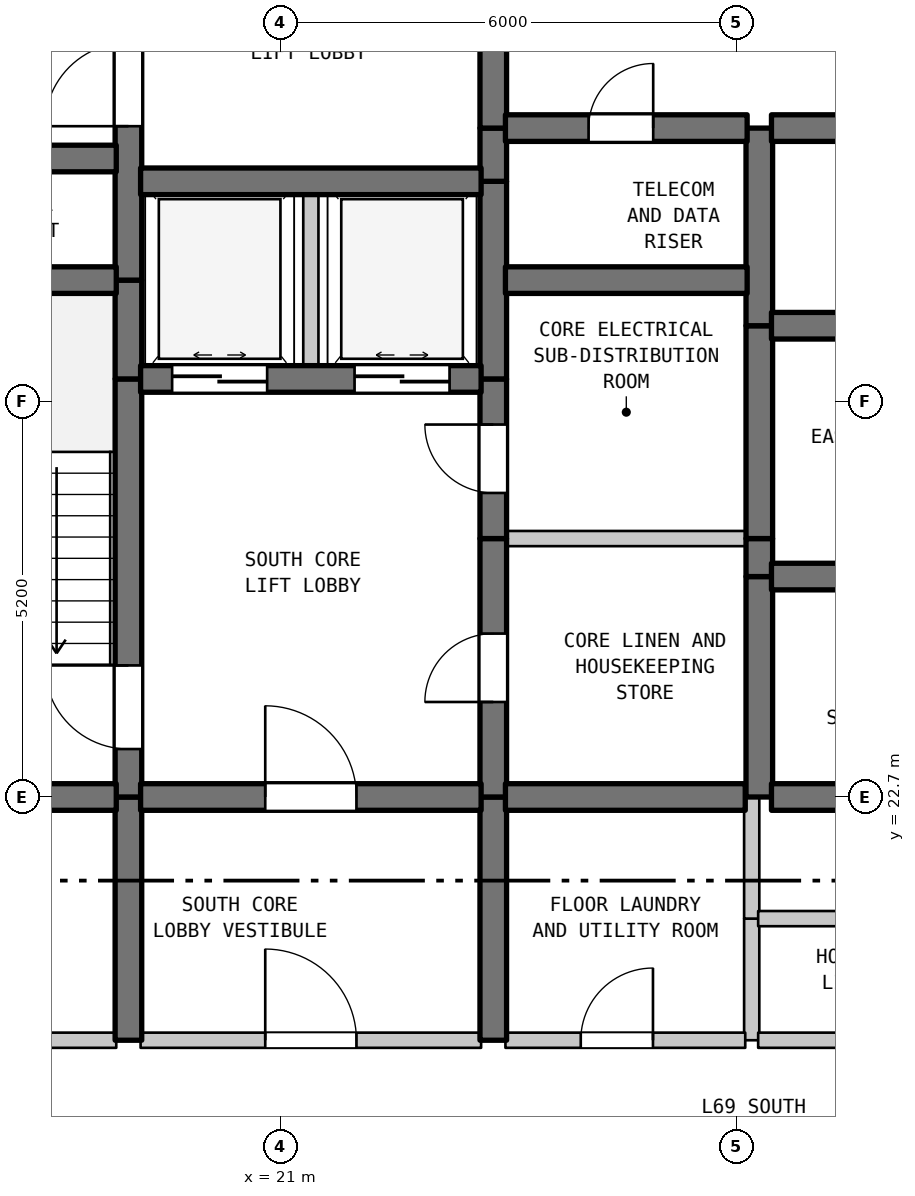
"""IFC4 building model, lengths in metres.
Left out: names, types, materials, properties, quantities, classifications, styles, units other than length and angle.
Written with IfcOpenShell. Run it as: python <this file> out.ifc"""

import sys

from ifc_helpers import new_model, si_unit, direction, frame, frame_2d, origin, place, context, subcontext, project, spatial, rectangle, extrude, element, fill, save


model = new_model("IFC4")
c1 = context("Model", 3, precision=1e-05, world=origin(), true_north=direction((0.0, 1.0)))
c2 = subcontext(c1, "Body", "Model", "MODEL_VIEW")
j1 = project(units=[si_unit("LENGTHUNIT", "METRE"), si_unit("PLANEANGLEUNIT", "RADIAN")], contexts=[c1])
p1 = place(None, origin())
s1 = spatial("IfcSite", under=j1, at=p1, CompositionType="ELEMENT")
p2 = place(p1, origin())
s2 = spatial("IfcBuilding", under=s1, at=p2, CompositionType="ELEMENT")
p3 = place(p2, frame((0.0, 0.0, 276.9)))
s3 = spatial("IfcBuildingStorey", under=s2, at=p3, CompositionType="ELEMENT", Elevation=276.9)
p4 = place(p3, frame((19.0, 19.5, 0.0), z_axis=(0.0, 0.0, 1.0), x_axis=(0.0, 1.0, 0.0)))
e1 = element("IfcWall", 1, at=p4, inside=s3, PredefinedType="SHEAR", context=c2, shape_type="SweptSolid", body=[
    extrude(rectangle(XDim=3.2, YDim=0.35, at=frame_2d((1.6, 0.0))), origin(), (0.0, 0.0, 1.0), 3.39),
])
p5 = place(p3, frame((19.0, 22.7, 0.0), z_axis=(0.0, 0.0, 1.0), x_axis=(0.0, 1.0, 0.0)))
e2 = element("IfcWall", 2, at=p5, inside=s3, PredefinedType="SHEAR", context=c2, shape_type="SweptSolid", body=[
    extrude(rectangle(XDim=5.5, YDim=0.35, at=frame_2d((2.75, 0.0))), origin(), (0.0, 0.0, 1.0), 3.39),
])
p6 = place(p5, frame((0.631, 0.0, 0.0)))
e3 = element("IfcOpeningElement", 3, at=p6, cuts=e2, PredefinedType="OPENING", context=c2, shape_type="SweptSolid", body=[
    extrude(rectangle(XDim=1.1, YDim=2.15, at=frame_2d((0.55, 1.075))), frame((0.0, 0.185, 0.0), z_axis=(0.0, -1.0, 0.0), x_axis=(1.0, 0.0, 0.0)), (0.0, 0.0, 1.0), 0.37),
])
p7 = place(p3, frame((19.0, 28.2, 0.0), z_axis=(0.0, 0.0, 1.0), x_axis=(0.0, 1.0, 0.0)))
e4 = element("IfcWall", 4, at=p7, inside=s3, PredefinedType="SHEAR", context=c2, shape_type="SweptSolid", body=[
    extrude(rectangle(XDim=1.3, YDim=0.35, at=frame_2d((0.65, 0.0))), origin(), (0.0, 0.0, 1.0), 3.39),
])
p8 = place(p3, frame((19.0, 29.5, 0.0), z_axis=(0.0, 0.0, 1.0), x_axis=(0.0, 1.0, 0.0)))
e5 = element("IfcWall", 5, at=p8, inside=s3, PredefinedType="SHEAR", context=c2, shape_type="SweptSolid", body=[
    extrude(rectangle(XDim=5.5, YDim=0.35, at=frame_2d((2.75, 0.0))), origin(), (0.0, 0.0, 1.0), 3.39),
])
p9 = place(p8, frame((2.025, 0.0, 0.0)))
e6 = element("IfcOpeningElement", 6, at=p9, cuts=e5, PredefinedType="OPENING", context=c2, shape_type="SweptSolid", body=[
    extrude(rectangle(XDim=1.1, YDim=2.15, at=frame_2d((0.55, 1.075))), frame((0.0, 0.185, 0.0), z_axis=(0.0, -1.0, 0.0), x_axis=(1.0, 0.0, 0.0)), (0.0, 0.0, 1.0), 0.37),
])
p10 = place(p3, frame((21.4, 28.2, 0.0), z_axis=(0.0, 0.0, 1.0), x_axis=(0.0, 1.0, 0.0)))
e7 = element("IfcWall", 7, at=p10, inside=s3, PredefinedType="STANDARD", context=c2, shape_type="SweptSolid", body=[
    extrude(rectangle(XDim=2.6, YDim=0.2, at=frame_2d((1.3, 0.0))), origin(), (0.0, 0.0, 1.0), 3.39),
])
p11 = place(p3, frame((23.8, 19.5, 0.0), z_axis=(0.0, 0.0, 1.0), x_axis=(0.0, 1.0, 0.0)))
e8 = element("IfcWall", 8, at=p11, inside=s3, PredefinedType="SHEAR", context=c2, shape_type="SweptSolid", body=[
    extrude(rectangle(XDim=3.2, YDim=0.35, at=frame_2d((1.6, 0.0))), origin(), (0.0, 0.0, 1.0), 3.39),
])
p12 = place(p3, frame((23.8, 22.7, 0.0), z_axis=(0.0, 0.0, 1.0), x_axis=(0.0, 1.0, 0.0)))
e9 = element("IfcWall", 9, at=p12, inside=s3, PredefinedType="SHEAR", context=c2, shape_type="SweptSolid", body=[
    extrude(rectangle(XDim=3.4, YDim=0.35, at=frame_2d((1.7, 0.0))), origin(), (0.0, 0.0, 1.0), 3.39),
])
p13 = place(p12, frame((1.25, 0.0, 0.0)))
e10 = element("IfcOpeningElement", 10, at=p13, cuts=e9, PredefinedType="OPENING", context=c2, shape_type="SweptSolid", body=[
    extrude(rectangle(XDim=0.9, YDim=2.15, at=frame_2d((0.45, 1.075))), frame((0.0, 0.185, 0.0), z_axis=(0.0, -1.0, 0.0), x_axis=(1.0, 0.0, 0.0)), (0.0, 0.0, 1.0), 0.37),
])
p14 = place(p3, frame((23.8, 26.1, 0.0), z_axis=(0.0, 0.0, 1.0), x_axis=(0.0, 1.0, 0.0)))
e11 = element("IfcWall", 11, at=p14, inside=s3, PredefinedType="SHEAR", context=c2, shape_type="SweptSolid", body=[
    extrude(rectangle(XDim=2.1, YDim=0.35, at=frame_2d((1.05, 0.0))), origin(), (0.0, 0.0, 1.0), 3.39),
])
p15 = place(p14, frame((0.6, 0.0, 0.0)))
e12 = element("IfcOpeningElement", 12, at=p15, cuts=e11, PredefinedType="OPENING", context=c2, shape_type="SweptSolid", body=[
    extrude(rectangle(XDim=0.9, YDim=2.15, at=frame_2d((0.45, 1.075))), frame((0.0, 0.185, 0.0), z_axis=(0.0, -1.0, 0.0), x_axis=(1.0, 0.0, 0.0)), (0.0, 0.0, 1.0), 0.37),
])
p16 = place(p3, frame((23.8, 28.2, 0.0), z_axis=(0.0, 0.0, 1.0), x_axis=(0.0, 1.0, 0.0)))
e13 = element("IfcWall", 13, at=p16, inside=s3, PredefinedType="SHEAR", context=c2, shape_type="SweptSolid", body=[
    extrude(rectangle(XDim=2.6, YDim=0.35, at=frame_2d((1.3, 0.0))), origin(), (0.0, 0.0, 1.0), 3.39),
])
p17 = place(p3, frame((23.8, 30.8, 0.0), z_axis=(0.0, 0.0, 1.0), x_axis=(0.0, 1.0, 0.0)))
e14 = element("IfcWall", 14, at=p17, inside=s3, PredefinedType="SHEAR", context=c2, shape_type="SweptSolid", body=[
    extrude(rectangle(XDim=0.7, YDim=0.35, at=frame_2d((0.35, 0.0))), origin(), (0.0, 0.0, 1.0), 3.39),
])
p18 = place(p3, frame((23.8, 31.5, 0.0), z_axis=(0.0, 0.0, 1.0), x_axis=(0.0, 1.0, 0.0)))
e15 = element("IfcWall", 15, at=p18, inside=s3, PredefinedType="SHEAR", context=c2, shape_type="SweptSolid", body=[
    extrude(rectangle(XDim=3.5, YDim=0.35, at=frame_2d((1.75, 0.0))), origin(), (0.0, 0.0, 1.0), 3.39),
])
p19 = place(p18, frame((1.127, 0.0, 0.0)))
e16 = element("IfcOpeningElement", 16, at=p19, cuts=e15, PredefinedType="OPENING", context=c2, shape_type="SweptSolid", body=[
    extrude(rectangle(XDim=1.1, YDim=2.15, at=frame_2d((0.55, 1.075))), frame((0.0, 0.185, 0.0), z_axis=(0.0, -1.0, 0.0), x_axis=(1.0, 0.0, 0.0)), (0.0, 0.0, 1.0), 0.37),
])
p20 = place(p3, frame((27.2, 19.5, 0.0), z_axis=(0.0, 0.0, 1.0), x_axis=(0.0, 1.0, 0.0)))
e17 = element("IfcWall", 17, at=p20, inside=s3, PredefinedType="STANDARD", context=c2, shape_type="SweptSolid", body=[
    extrude(rectangle(XDim=1.6, YDim=0.2, at=frame_2d((0.8, 0.0))), origin(), (0.0, 0.0, 1.0), 3.39),
])
p21 = place(p3, frame((27.2, 21.1, 0.0), z_axis=(0.0, 0.0, 1.0), x_axis=(0.0, 1.0, 0.0)))
e18 = element("IfcWall", 18, at=p21, inside=s3, PredefinedType="STANDARD", context=c2, shape_type="SweptSolid", body=[
    extrude(rectangle(XDim=1.6, YDim=0.2, at=frame_2d((0.8, 0.0))), origin(), (0.0, 0.0, 1.0), 3.39),
])
p22 = place(p3, frame((27.3, 22.7, 0.0), z_axis=(0.0, 0.0, 1.0), x_axis=(0.0, 1.0, 0.0)))
e19 = element("IfcWall", 19, at=p22, inside=s3, PredefinedType="SHEAR", context=c2, shape_type="SweptSolid", body=[
    extrude(rectangle(XDim=2.9, YDim=0.35, at=frame_2d((1.45, 0.0))), origin(), (0.0, 0.0, 1.0), 3.39),
])
p23 = place(p3, frame((27.3, 25.6, 0.0), z_axis=(0.0, 0.0, 1.0), x_axis=(0.0, 1.0, 0.0)))
e20 = element("IfcWall", 20, at=p23, inside=s3, PredefinedType="SHEAR", context=c2, shape_type="SweptSolid", body=[
    extrude(rectangle(XDim=0.5, YDim=0.35, at=frame_2d((0.25, 0.0))), origin(), (0.0, 0.0, 1.0), 3.39),
])
p24 = place(p3, frame((27.3, 26.1, 0.0), z_axis=(0.0, 0.0, 1.0), x_axis=(0.0, 1.0, 0.0)))
e21 = element("IfcWall", 21, at=p24, inside=s3, PredefinedType="SHEAR", context=c2, shape_type="SweptSolid", body=[
    extrude(rectangle(XDim=2.8, YDim=0.35, at=frame_2d((1.4, 0.0))), origin(), (0.0, 0.0, 1.0), 3.39),
])
p25 = place(p3, frame((27.3, 28.9, 0.0), z_axis=(0.0, 0.0, 1.0), x_axis=(0.0, 1.0, 0.0)))
e22 = element("IfcWall", 22, at=p25, inside=s3, PredefinedType="SHEAR", context=c2, shape_type="SweptSolid", body=[
    extrude(rectangle(XDim=2.6, YDim=0.35, at=frame_2d((1.3, 0.0))), origin(), (0.0, 0.0, 1.0), 3.39),
])
p26 = place(p3, frame((15.16, 19.5, 0.0), z_axis=(0.0, 0.0, 1.0), x_axis=(1.0, 0.0, 0.0)))
e23 = element("IfcWall", 23, at=p26, inside=s3, PredefinedType="STANDARD", context=c2, shape_type="SweptSolid", body=[
    extrude(rectangle(XDim=3.68, YDim=0.2, at=frame_2d((1.84, 0.0))), origin(), (0.0, 0.0, 1.0), 3.39),
])
p27 = place(p26, frame((1.39, 0.0, 0.0)))
e24 = element("IfcOpeningElement", 24, at=p27, cuts=e23, PredefinedType="OPENING", context=c2, shape_type="SweptSolid", body=[
    extrude(rectangle(XDim=0.9, YDim=2.15, at=frame_2d((0.45, 1.075))), frame((0.0, 0.11, 0.0), z_axis=(0.0, -1.0, 0.0), x_axis=(1.0, 0.0, 0.0)), (0.0, 0.0, 1.0), 0.22),
])
p28 = place(p3, frame((19.16, 19.5, 0.0), z_axis=(0.0, 0.0, 1.0), x_axis=(1.0, 0.0, 0.0)))
e25 = element("IfcWall", 25, at=p28, inside=s3, PredefinedType="STANDARD", context=c2, shape_type="SweptSolid", body=[
    extrude(rectangle(XDim=4.48, YDim=0.2, at=frame_2d((2.24, 0.0))), origin(), (0.0, 0.0, 1.0), 3.39),
])
p29 = place(p28, frame((1.64, 0.0, 0.0)))
e26 = element("IfcOpeningElement", 26, at=p29, cuts=e25, PredefinedType="OPENING", context=c2, shape_type="SweptSolid", body=[
    extrude(rectangle(XDim=1.2, YDim=2.2, at=frame_2d((0.6, 1.1))), frame((0.0, 0.11, 0.0), z_axis=(0.0, -1.0, 0.0), x_axis=(1.0, 0.0, 0.0)), (0.0, 0.0, 1.0), 0.22),
])
p30 = place(p3, frame((23.96, 19.5, 0.0), z_axis=(0.0, 0.0, 1.0), x_axis=(1.0, 0.0, 0.0)))
e27 = element("IfcWall", 27, at=p30, inside=s3, PredefinedType="STANDARD", context=c2, shape_type="SweptSolid", body=[
    extrude(rectangle(XDim=3.155, YDim=0.2, at=frame_2d((1.578, 0.0))), origin(), (0.0, 0.0, 1.0), 3.39),
])
p31 = place(p30, frame((0.991, 0.0, 0.0)))
e28 = element("IfcOpeningElement", 28, at=p31, cuts=e27, PredefinedType="OPENING", context=c2, shape_type="SweptSolid", body=[
    extrude(rectangle(XDim=0.95, YDim=2.15, at=frame_2d((0.475, 1.075))), frame((0.0, 0.11, 0.0), z_axis=(0.0, -1.0, 0.0), x_axis=(1.0, 0.0, 0.0)), (0.0, 0.0, 1.0), 0.22),
])
p32 = place(p3, frame((27.285, 19.5, 0.0), z_axis=(0.0, 0.0, 1.0), x_axis=(1.0, 0.0, 0.0)))
e29 = element("IfcWall", 29, at=p32, inside=s3, PredefinedType="STANDARD", context=c2, shape_type="SweptSolid", body=[
    extrude(rectangle(XDim=3.43, YDim=0.2, at=frame_2d((1.715, 0.0))), origin(), (0.0, 0.0, 1.0), 3.39),
])
p33 = place(p32, frame((1.192, 0.0, 0.0)))
e30 = element("IfcOpeningElement", 30, at=p33, cuts=e29, PredefinedType="OPENING", context=c2, shape_type="SweptSolid", body=[
    extrude(rectangle(XDim=0.9, YDim=2.15, at=frame_2d((0.45, 1.075))), frame((0.0, 0.11, 0.0), z_axis=(0.0, -1.0, 0.0), x_axis=(1.0, 0.0, 0.0)), (0.0, 0.0, 1.0), 0.22),
])
p34 = place(p3, frame((27.285, 21.1, 0.0), z_axis=(0.0, 0.0, 1.0), x_axis=(1.0, 0.0, 0.0)))
e31 = element("IfcWall", 31, at=p34, inside=s3, PredefinedType="STANDARD", context=c2, shape_type="SweptSolid", body=[
    extrude(rectangle(XDim=3.355, YDim=0.2, at=frame_2d((1.677, 0.0))), origin(), (0.0, 0.0, 1.0), 3.39),
])
p35 = place(p3, frame((15.16, 22.7, 0.0), z_axis=(0.0, 0.0, 1.0), x_axis=(1.0, 0.0, 0.0)))
e32 = element("IfcWall", 32, at=p35, inside=s3, PredefinedType="SHEAR", context=c2, shape_type="SweptSolid", body=[
    extrude(rectangle(XDim=3.68, YDim=0.35, at=frame_2d((1.84, 0.0))), origin(), (0.0, 0.0, 1.0), 3.39),
])
p36 = place(p3, frame((19.16, 22.7, 0.0), z_axis=(0.0, 0.0, 1.0), x_axis=(1.0, 0.0, 0.0)))
e33 = element("IfcWall", 33, at=p36, inside=s3, PredefinedType="SHEAR", context=c2, shape_type="SweptSolid", body=[
    extrude(rectangle(XDim=4.48, YDim=0.35, at=frame_2d((2.24, 0.0))), origin(), (0.0, 0.0, 1.0), 3.39),
])
p37 = place(p36, frame((1.64, 0.0, 0.0)))
e34 = element("IfcOpeningElement", 34, at=p37, cuts=e33, PredefinedType="OPENING", context=c2, shape_type="SweptSolid", body=[
    extrude(rectangle(XDim=1.2, YDim=2.2, at=frame_2d((0.6, 1.1))), frame((0.0, 0.185, 0.0), z_axis=(0.0, -1.0, 0.0), x_axis=(1.0, 0.0, 0.0)), (0.0, 0.0, 1.0), 0.37),
])
p38 = place(p3, frame((23.96, 22.7, 0.0), z_axis=(0.0, 0.0, 1.0), x_axis=(1.0, 0.0, 0.0)))
e35 = element("IfcWall", 35, at=p38, inside=s3, PredefinedType="SHEAR", context=c2, shape_type="SweptSolid", body=[
    extrude(rectangle(XDim=3.155, YDim=0.35, at=frame_2d((1.578, 0.0))), origin(), (0.0, 0.0, 1.0), 3.39),
])
p39 = place(p3, frame((27.46, 22.7, 0.0), z_axis=(0.0, 0.0, 1.0), x_axis=(1.0, 0.0, 0.0)))
e36 = element("IfcWall", 36, at=p39, inside=s3, PredefinedType="SHEAR", context=c2, shape_type="SweptSolid", body=[
    extrude(rectangle(XDim=3.18, YDim=0.35, at=frame_2d((1.59, 0.0))), origin(), (0.0, 0.0, 1.0), 3.39),
])
p40 = place(p3, frame((27.46, 25.6, 0.0), z_axis=(0.0, 0.0, 1.0), x_axis=(1.0, 0.0, 0.0)))
e37 = element("IfcWall", 37, at=p40, inside=s3, PredefinedType="SHEAR", context=c2, shape_type="SweptSolid", body=[
    extrude(rectangle(XDim=3.18, YDim=0.35, at=frame_2d((1.59, 0.0))), origin(), (0.0, 0.0, 1.0), 3.39),
])
p41 = place(p40, frame((1.115, 0.0, 0.0)))
e38 = element("IfcOpeningElement", 38, at=p41, cuts=e37, PredefinedType="OPENING", context=c2, shape_type="SweptSolid", body=[
    extrude(rectangle(XDim=0.95, YDim=2.15, at=frame_2d((0.475, 1.075))), frame((0.0, 0.185, 0.0), z_axis=(0.0, -1.0, 0.0), x_axis=(1.0, 0.0, 0.0)), (0.0, 0.0, 1.0), 0.37),
])
p42 = place(p3, frame((23.96, 26.1, 0.0), z_axis=(0.0, 0.0, 1.0), x_axis=(1.0, 0.0, 0.0)))
e39 = element("IfcWall", 39, at=p42, inside=s3, PredefinedType="STANDARD", context=c2, shape_type="SweptSolid", body=[
    extrude(rectangle(XDim=3.18, YDim=0.2, at=frame_2d((1.59, 0.0))), origin(), (0.0, 0.0, 1.0), 3.39),
])
p43 = place(p3, frame((19.16, 28.2, 0.0), z_axis=(0.0, 0.0, 1.0), x_axis=(1.0, 0.0, 0.0)))
e40 = element("IfcWall", 40, at=p43, inside=s3, PredefinedType="SHEAR", context=c2, shape_type="SweptSolid", body=[
    extrude(rectangle(XDim=4.48, YDim=0.35, at=frame_2d((2.24, 0.0))), origin(), (0.0, 0.0, 1.0), 3.39),
])
p44 = place(p43, frame((0.415, 0.0, 0.0)))
e41 = element("IfcOpeningElement", 41, at=p44, cuts=e40, PredefinedType="OPENING", context=c2, shape_type="SweptSolid", body=[
    extrude(rectangle(XDim=1.25, YDim=2.2, at=frame_2d((0.625, 1.1))), frame((0.0, 0.185, 0.0), z_axis=(0.0, -1.0, 0.0), x_axis=(1.0, 0.0, 0.0)), (0.0, 0.0, 1.0), 0.37),
])
p45 = place(p43, frame((2.815, 0.0, 0.0)))
e42 = element("IfcOpeningElement", 42, at=p45, cuts=e40, PredefinedType="OPENING", context=c2, shape_type="SweptSolid", body=[
    extrude(rectangle(XDim=1.25, YDim=2.2, at=frame_2d((0.625, 1.1))), frame((0.0, 0.185, 0.0), z_axis=(0.0, -1.0, 0.0), x_axis=(1.0, 0.0, 0.0)), (0.0, 0.0, 1.0), 0.37),
])
p46 = place(p3, frame((27.46, 28.9, 0.0), z_axis=(0.0, 0.0, 1.0), x_axis=(1.0, 0.0, 0.0)))
e43 = element("IfcWall", 43, at=p46, inside=s3, PredefinedType="SHEAR", context=c2, shape_type="SweptSolid", body=[
    extrude(rectangle(XDim=3.18, YDim=0.35, at=frame_2d((1.59, 0.0))), origin(), (0.0, 0.0, 1.0), 3.39),
])
p47 = place(p46, frame((1.115, 0.0, 0.0)))
e44 = element("IfcOpeningElement", 44, at=p47, cuts=e43, PredefinedType="OPENING", context=c2, shape_type="SweptSolid", body=[
    extrude(rectangle(XDim=0.95, YDim=2.15, at=frame_2d((0.475, 1.075))), frame((0.0, 0.185, 0.0), z_axis=(0.0, -1.0, 0.0), x_axis=(1.0, 0.0, 0.0)), (0.0, 0.0, 1.0), 0.37),
])
p48 = place(p3, frame((15.16, 29.5, 0.0), z_axis=(0.0, 0.0, 1.0), x_axis=(1.0, 0.0, 0.0)))
e45 = element("IfcWall", 45, at=p48, inside=s3, PredefinedType="SHEAR", context=c2, shape_type="SweptSolid", body=[
    extrude(rectangle(XDim=3.68, YDim=0.35, at=frame_2d((1.84, 0.0))), origin(), (0.0, 0.0, 1.0), 3.39),
])
p49 = place(p3, frame((23.96, 29.5, 0.0), z_axis=(0.0, 0.0, 1.0), x_axis=(1.0, 0.0, 0.0)))
e46 = element("IfcWall", 46, at=p49, inside=s3, PredefinedType="SHEAR", context=c2, shape_type="SweptSolid", body=[
    extrude(rectangle(XDim=3.18, YDim=0.35, at=frame_2d((1.59, 0.0))), origin(), (0.0, 0.0, 1.0), 3.39),
])
p50 = place(p3, frame((19.16, 30.8, 0.0), z_axis=(0.0, 0.0, 1.0), x_axis=(1.0, 0.0, 0.0)))
e47 = element("IfcWall", 47, at=p50, inside=s3, PredefinedType="SHEAR", context=c2, shape_type="SweptSolid", body=[
    extrude(rectangle(XDim=4.48, YDim=0.35, at=frame_2d((2.24, 0.0))), origin(), (0.0, 0.0, 1.0), 3.39),
])
p51 = place(p3, frame((15.16, 31.1, 0.0), z_axis=(0.0, 0.0, 1.0), x_axis=(1.0, 0.0, 0.0)))
e48 = element("IfcWall", 48, at=p51, inside=s3, PredefinedType="SHEAR", context=c2, shape_type="SweptSolid", body=[
    extrude(rectangle(XDim=3.68, YDim=0.35, at=frame_2d((1.84, 0.0))), origin(), (0.0, 0.0, 1.0), 3.39),
])
p52 = place(p3, frame((23.96, 31.5, 0.0), z_axis=(0.0, 0.0, 1.0), x_axis=(1.0, 0.0, 0.0)))
e49 = element("IfcWall", 49, at=p52, inside=s3, PredefinedType="SHEAR", context=c2, shape_type="SweptSolid", body=[
    extrude(rectangle(XDim=3.18, YDim=0.35, at=frame_2d((1.59, 0.0))), origin(), (0.0, 0.0, 1.0), 3.39),
])
p53 = place(p52, frame((1.094, 0.0, 0.0)))
e50 = element("IfcOpeningElement", 50, at=p53, cuts=e49, PredefinedType="OPENING", context=c2, shape_type="SweptSolid", body=[
    extrude(rectangle(XDim=0.85, YDim=2.1, at=frame_2d((0.425, 1.05))), frame((0.0, 0.185, 0.0), z_axis=(0.0, -1.0, 0.0), x_axis=(1.0, 0.0, 0.0)), (0.0, 0.0, 1.0), 0.37),
])
p54 = place(p3, frame((27.46, 31.5, 0.0), z_axis=(0.0, 0.0, 1.0), x_axis=(1.0, 0.0, 0.0)))
e51 = element("IfcWall", 51, at=p54, inside=s3, PredefinedType="SHEAR", context=c2, shape_type="SweptSolid", body=[
    extrude(rectangle(XDim=3.18, YDim=0.35, at=frame_2d((1.59, 0.0))), origin(), (0.0, 0.0, 1.0), 3.39),
])
p55 = place(p6, origin())
e52 = element("IfcDoor", 52, at=p55, inside=s3, OperationType="SINGLE_SWING_RIGHT", PredefinedType="DOOR", context=c2, shape_type="SweptSolid", body=[
    extrude(rectangle(XDim=1.1, YDim=2.15, at=frame_2d((0.55, 1.075))), frame((0.0, 0.025, 0.0), z_axis=(0.0, -1.0, 0.0), x_axis=(1.0, 0.0, 0.0)), (0.0, 0.0, 1.0), 0.05),
])
fill(e3, e52)
p56 = place(p9, origin())
e53 = element("IfcDoor", 53, at=p56, inside=s3, OperationType="SINGLE_SWING_LEFT", PredefinedType="DOOR", context=c2, shape_type="SweptSolid", body=[
    extrude(rectangle(XDim=1.1, YDim=2.15, at=frame_2d((0.55, 1.075))), frame((0.0, 0.025, 0.0), z_axis=(0.0, -1.0, 0.0), x_axis=(1.0, 0.0, 0.0)), (0.0, 0.0, 1.0), 0.05),
])
fill(e6, e53)
p57 = place(p13, origin())
e54 = element("IfcDoor", 54, at=p57, inside=s3, OperationType="SINGLE_SWING_LEFT", PredefinedType="DOOR", context=c2, shape_type="SweptSolid", body=[
    extrude(rectangle(XDim=0.9, YDim=2.15, at=frame_2d((0.45, 1.075))), frame((0.0, 0.025, 0.0), z_axis=(0.0, -1.0, 0.0), x_axis=(1.0, 0.0, 0.0)), (0.0, 0.0, 1.0), 0.05),
])
fill(e10, e54)
p58 = place(p15, origin())
e55 = element("IfcDoor", 55, at=p58, inside=s3, OperationType="SINGLE_SWING_RIGHT", PredefinedType="DOOR", context=c2, shape_type="SweptSolid", body=[
    extrude(rectangle(XDim=0.9, YDim=2.15, at=frame_2d((0.45, 1.075))), frame((0.0, 0.025, 0.0), z_axis=(0.0, -1.0, 0.0), x_axis=(1.0, 0.0, 0.0)), (0.0, 0.0, 1.0), 0.05),
])
fill(e12, e55)
p59 = place(p29, origin())
e56 = element("IfcDoor", 56, at=p59, inside=s3, OperationType="SINGLE_SWING_LEFT", PredefinedType="DOOR", context=c2, shape_type="SweptSolid", body=[
    extrude(rectangle(XDim=1.2, YDim=2.2, at=frame_2d((0.6, 1.1))), frame((0.0, 0.025, 0.0), z_axis=(0.0, -1.0, 0.0), x_axis=(1.0, 0.0, 0.0)), (0.0, 0.0, 1.0), 0.05),
])
fill(e26, e56)
p60 = place(p31, origin())
e57 = element("IfcDoor", 57, at=p60, inside=s3, OperationType="SINGLE_SWING_RIGHT", PredefinedType="DOOR", context=c2, shape_type="SweptSolid", body=[
    extrude(rectangle(XDim=0.95, YDim=2.15, at=frame_2d((0.475, 1.075))), frame((0.0, 0.025, 0.0), z_axis=(0.0, -1.0, 0.0), x_axis=(1.0, 0.0, 0.0)), (0.0, 0.0, 1.0), 0.05),
])
fill(e28, e57)
p61 = place(p37, origin())
e58 = element("IfcDoor", 58, at=p61, inside=s3, OperationType="SINGLE_SWING_LEFT", PredefinedType="DOOR", context=c2, shape_type="SweptSolid", body=[
    extrude(rectangle(XDim=1.2, YDim=2.2, at=frame_2d((0.6, 1.1))), frame((0.0, 0.025, 0.0), z_axis=(0.0, -1.0, 0.0), x_axis=(1.0, 0.0, 0.0)), (0.0, 0.0, 1.0), 0.05),
])
fill(e34, e58)
p62 = place(p44, origin())
e59 = element("IfcDoor", 59, at=p62, inside=s3, OperationType="DOUBLE_DOOR_SLIDING", PredefinedType="DOOR", context=c2, shape_type="SweptSolid", body=[
    extrude(rectangle(XDim=1.25, YDim=2.2, at=frame_2d((0.625, 1.1))), frame((0.0, 0.025, 0.0), z_axis=(0.0, -1.0, 0.0), x_axis=(1.0, 0.0, 0.0)), (0.0, 0.0, 1.0), 0.05),
])
fill(e41, e59)
p63 = place(p45, origin())
e60 = element("IfcDoor", 60, at=p63, inside=s3, OperationType="DOUBLE_DOOR_SLIDING", PredefinedType="DOOR", context=c2, shape_type="SweptSolid", body=[
    extrude(rectangle(XDim=1.25, YDim=2.2, at=frame_2d((0.625, 1.1))), frame((0.0, 0.025, 0.0), z_axis=(0.0, -1.0, 0.0), x_axis=(1.0, 0.0, 0.0)), (0.0, 0.0, 1.0), 0.05),
])
fill(e42, e60)
p64 = place(p53, origin())
e61 = element("IfcDoor", 61, at=p64, inside=s3, OperationType="SINGLE_SWING_RIGHT", PredefinedType="DOOR", context=c2, shape_type="SweptSolid", body=[
    extrude(rectangle(XDim=0.85, YDim=2.1, at=frame_2d((0.425, 1.05))), frame((0.0, 0.025, 0.0), z_axis=(0.0, -1.0, 0.0), x_axis=(1.0, 0.0, 0.0)), (0.0, 0.0, 1.0), 0.05),
])
fill(e50, e61)
save(model, sys.argv[1])
